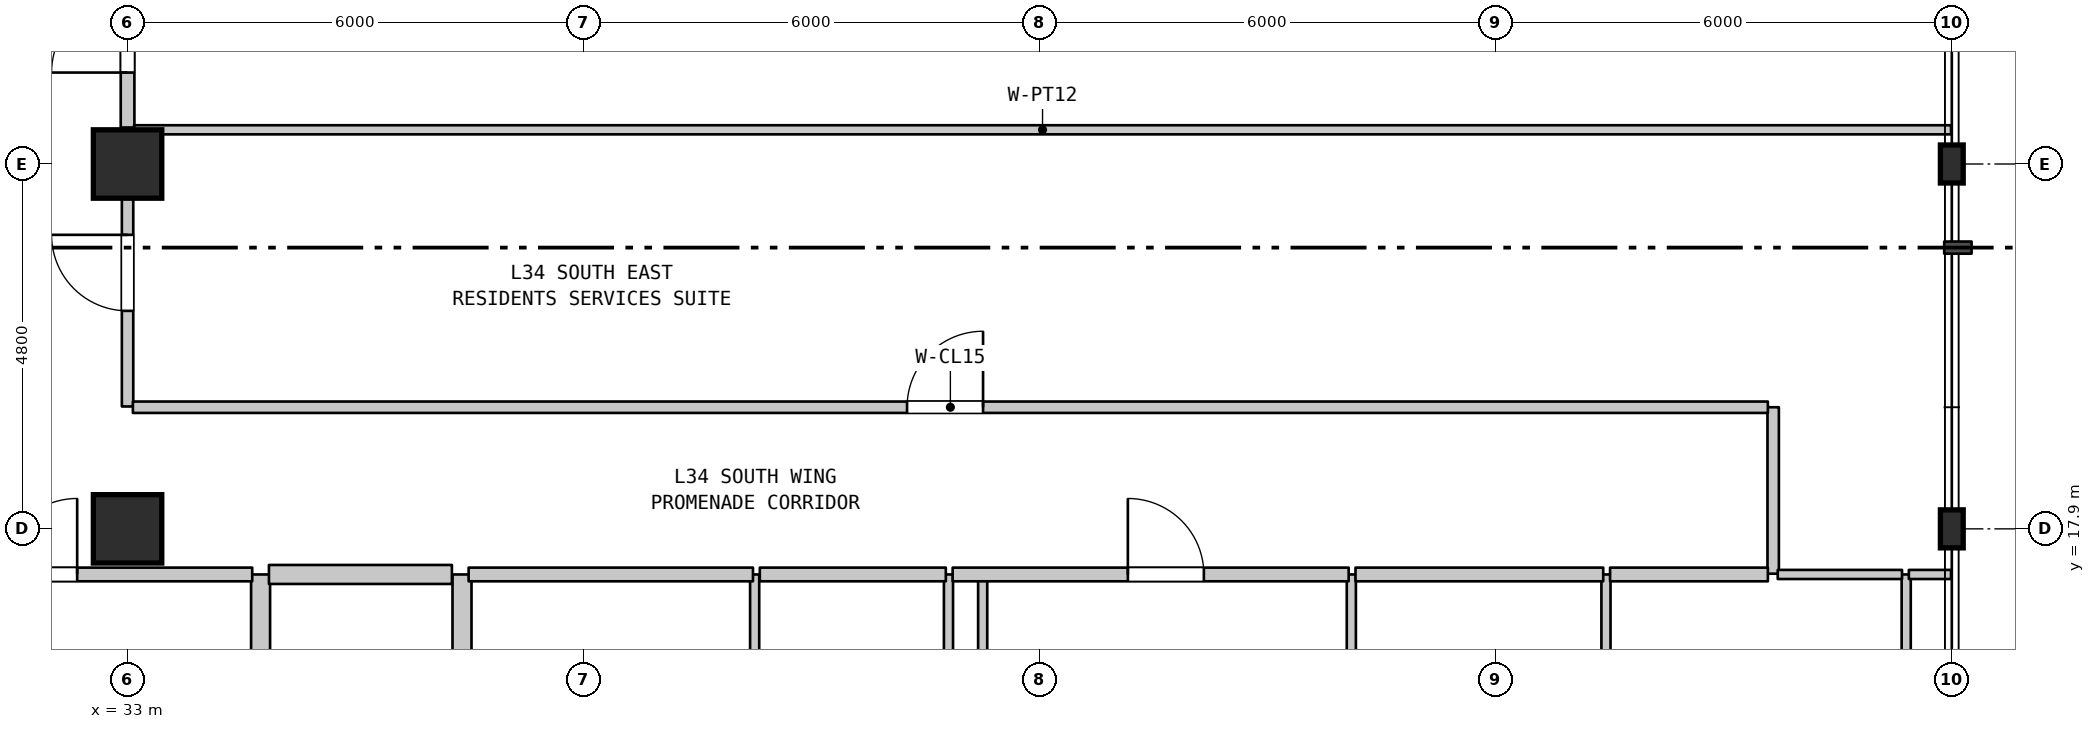
"""IFC4 building model, lengths in metres.
Left out: names, types, materials, properties, quantities, classifications, styles, units other than length and angle.
Written with IfcOpenShell. Run it as: python <this file> out.ifc"""

import sys

from ifc_helpers import new_model, si_unit, direction, frame, frame_2d, origin, origin_2d, place, context, subcontext, project, spatial, rectangle, i_section, extrude, element, fill, save


model = new_model("IFC4")
c1 = context("Model", 3, precision=1e-05, world=origin(), true_north=direction((0.0, 1.0)))
c2 = subcontext(c1, "Body", "Model", "MODEL_VIEW")
j1 = project(units=[si_unit("LENGTHUNIT", "METRE"), si_unit("PLANEANGLEUNIT", "RADIAN")], contexts=[c1])
p1 = place(None, origin())
s1 = spatial("IfcSite", under=j1, at=p1, CompositionType="ELEMENT")
p2 = place(p1, origin())
s2 = spatial("IfcBuilding", under=s1, at=p2, CompositionType="ELEMENT")
p3 = place(p2, frame((0.0, 0.0, 140.9)))
s3 = spatial("IfcBuildingStorey", under=s2, at=p3, CompositionType="ELEMENT", Elevation=140.9)
for number, where, z_axis, x_axis in (
    (1, (33.0, 17.9, 0.0), (0.0, 0.0, 1.0), (1.0, 0.0, 0.0)),
    (2, (33.0, 22.7, 0.0), (0.0, 0.0, 1.0), (1.0, 0.0, 0.0)),
):
    element("IfcColumn", number, at=place(p3, frame(where, z_axis=z_axis, x_axis=x_axis)), inside=s3, PredefinedType="COLUMN", context=c2, shape_type="SweptSolid", body=[
        extrude(rectangle(XDim=0.9, YDim=0.9, at=origin_2d()), origin(), (0.0, 0.0, 1.0), 3.7),
    ])
for number, where, z_axis, x_axis in (
    (3, (57.0, 17.9, 0.0), (0.0, 0.0, 1.0), (1.0, 0.0, 0.0)),
    (4, (57.0, 22.7, 0.0), (0.0, 0.0, 1.0), (1.0, 0.0, 0.0)),
):
    element("IfcColumn", number, at=place(p3, frame(where, z_axis=z_axis, x_axis=x_axis)), inside=s3, PredefinedType="COLUMN", context=c2, shape_type="SweptSolid", body=[
        extrude(i_section(OverallWidth=0.3, OverallDepth=0.5, WebThickness=0.014, FlangeThickness=0.028, FilletRadius=0.027, at=origin_2d()), origin(), (0.0, 0.0, 1.0), 3.7),
    ])
p4 = place(p3, frame((33.0, 19.51, 0.0), z_axis=(0.0, 0.0, 1.0), x_axis=(0.0, 1.0, 0.0)))
e5 = element("IfcWall", 5, at=p4, inside=s3, PredefinedType="STANDARD", context=c2, shape_type="SweptSolid", body=[
    extrude(rectangle(XDim=3.66, YDim=0.15, at=frame_2d((1.83, 0.0))), origin(), (0.0, 0.0, 1.0), 2.935),
])
p5 = place(p4, frame((1.258, 0.0, 0.0)))
e6 = element("IfcOpeningElement", 6, at=p5, cuts=e5, PredefinedType="OPENING", context=c2, shape_type="SweptSolid", body=[
    extrude(rectangle(XDim=1.0, YDim=2.15, at=frame_2d((0.5, 1.075))), frame((0.0, 0.085, 0.0), z_axis=(0.0, -1.0, 0.0), x_axis=(1.0, 0.0, 0.0)), (0.0, 0.0, 1.0), 0.17),
])
p6 = place(p3, frame((33.0, 23.18, 0.0), z_axis=(0.0, 0.0, 1.0), x_axis=(0.0, 1.0, 0.0)))
e7 = element("IfcWall", 7, at=p6, inside=s3, PredefinedType="STANDARD", context=c2, shape_type="SweptSolid", body=[
    extrude(rectangle(XDim=2.6, YDim=0.18, at=frame_2d((1.3, 0.0))), origin(), (0.0, 0.0, 1.0), 2.935),
])
p7 = place(p6, frame((0.723, 0.0, 0.0)))
e8 = element("IfcOpeningElement", 8, at=p7, cuts=e7, PredefinedType="OPENING", context=c2, shape_type="SweptSolid", body=[
    extrude(rectangle(XDim=1.0, YDim=2.15, at=frame_2d((0.5, 1.075))), frame((0.0, 0.1, 0.0), z_axis=(0.0, -1.0, 0.0), x_axis=(1.0, 0.0, 0.0)), (0.0, 0.0, 1.0), 0.2),
])
for number, where, z_axis, x_axis in (
    (9, (34.75, 11.15, 0.0), (0.0, 0.0, 1.0), (0.0, 1.0, 0.0)),
    (10, (37.4, 11.15, 0.0), (0.0, 0.0, 1.0), (0.0, 1.0, 0.0)),
):
    element("IfcWall", number, at=place(p3, frame(where, z_axis=z_axis, x_axis=x_axis)), inside=s3, PredefinedType="STANDARD", context=c2, shape_type="SweptSolid", body=[
        extrude(rectangle(XDim=6.15, YDim=0.25, at=frame_2d((3.075, 0.0))), origin(), (0.0, 0.0, 1.0), 3.385),
    ])
for number, where, z_axis, x_axis in (
    (11, (41.25, 11.15, 0.0), (0.0, 0.0, 1.0), (0.0, 1.0, 0.0)),
    (12, (43.8, 11.15, 0.0), (0.0, 0.0, 1.0), (0.0, 1.0, 0.0)),
):
    element("IfcWall", number, at=place(p3, frame(where, z_axis=z_axis, x_axis=x_axis)), inside=s3, PredefinedType="PARTITIONING", context=c2, shape_type="SweptSolid", body=[
        extrude(rectangle(XDim=6.15, YDim=0.12, at=frame_2d((3.075, 0.0))), origin(), (0.0, 0.0, 1.0), 3.385),
    ])
p8 = place(p3, frame((44.25, 14.85, 0.0), z_axis=(0.0, 0.0, 1.0), x_axis=(0.0, 1.0, 0.0)))
e13 = element("IfcWall", 13, at=p8, inside=s3, PredefinedType="PARTITIONING", context=c2, shape_type="SweptSolid", body=[
    extrude(rectangle(XDim=2.45, YDim=0.12, at=frame_2d((1.225, 0.0))), origin(), (0.0, 0.0, 1.0), 3.385),
])
for number, where, z_axis, x_axis in (
    (14, (49.1, 11.15, 0.0), (0.0, 0.0, 1.0), (0.0, 1.0, 0.0)),
    (15, (52.45, 11.15, 0.0), (0.0, 0.0, 1.0), (0.0, 1.0, 0.0)),
):
    element("IfcWall", number, at=place(p3, frame(where, z_axis=z_axis, x_axis=x_axis)), inside=s3, PredefinedType="PARTITIONING", context=c2, shape_type="SweptSolid", body=[
        extrude(rectangle(XDim=6.15, YDim=0.12, at=frame_2d((3.075, 0.0))), origin(), (0.0, 0.0, 1.0), 3.385),
    ])
p9 = place(p3, frame((54.65, 17.31, 0.0), z_axis=(0.0, 0.0, 1.0), x_axis=(0.0, 1.0, 0.0)))
e16 = element("IfcWall", 16, at=p9, inside=s3, PredefinedType="STANDARD", context=c2, shape_type="SweptSolid", body=[
    extrude(rectangle(XDim=2.19, YDim=0.15, at=frame_2d((1.095, 0.0))), origin(), (0.0, 0.0, 1.0), 3.385),
])
p10 = place(p3, frame((56.4, 11.15, 0.0), z_axis=(0.0, 0.0, 1.0), x_axis=(0.0, 1.0, 0.0)))
e17 = element("IfcWall", 17, at=p10, inside=s3, PredefinedType="PARTITIONING", context=c2, shape_type="SweptSolid", body=[
    extrude(rectangle(XDim=6.15, YDim=0.12, at=frame_2d((3.075, 0.0))), origin(), (0.0, 0.0, 1.0), 3.385),
])
p11 = place(p3, frame((29.545, 17.3, 0.0), z_axis=(0.0, 0.0, 1.0), x_axis=(1.0, 0.0, 0.0)))
e18 = element("IfcWall", 18, at=p11, inside=s3, PredefinedType="STANDARD", context=c2, shape_type="SweptSolid", body=[
    extrude(rectangle(XDim=5.095, YDim=0.18, at=frame_2d((2.547, 0.0))), origin(), (0.0, 0.0, 1.0), 3.385),
])
p12 = place(p11, frame((1.792, 0.0, 0.0)))
e19 = element("IfcOpeningElement", 19, at=p12, cuts=e18, PredefinedType="OPENING", context=c2, shape_type="SweptSolid", body=[
    extrude(rectangle(XDim=1.0, YDim=2.15, at=frame_2d((0.5, 1.075))), frame((0.0, 0.1, 0.0), z_axis=(0.0, -1.0, 0.0), x_axis=(1.0, 0.0, 0.0)), (0.0, 0.0, 1.0), 0.2),
])
p13 = place(p3, frame((34.86, 17.3, 0.0), z_axis=(0.0, 0.0, 1.0), x_axis=(1.0, 0.0, 0.0)))
e20 = element("IfcWall", 20, at=p13, inside=s3, PredefinedType="STANDARD", context=c2, shape_type="SweptSolid", body=[
    extrude(rectangle(XDim=2.407, YDim=0.25, at=frame_2d((1.204, 0.0))), origin(), (0.0, 0.0, 1.0), 3.385),
])
p14 = place(p3, frame((37.487, 17.3, 0.0), z_axis=(0.0, 0.0, 1.0), x_axis=(1.0, 0.0, 0.0)))
e21 = element("IfcWall", 21, at=p14, inside=s3, PredefinedType="STANDARD", context=c2, shape_type="SweptSolid", body=[
    extrude(rectangle(XDim=3.741, YDim=0.18, at=frame_2d((1.871, 0.0))), origin(), (0.0, 0.0, 1.0), 3.385),
])
p15 = place(p3, frame((41.318, 17.3, 0.0), z_axis=(0.0, 0.0, 1.0), x_axis=(1.0, 0.0, 0.0)))
e22 = element("IfcWall", 22, at=p15, inside=s3, PredefinedType="STANDARD", context=c2, shape_type="SweptSolid", body=[
    extrude(rectangle(XDim=2.447, YDim=0.18, at=frame_2d((1.223, 0.0))), origin(), (0.0, 0.0, 1.0), 3.385),
])
p16 = place(p3, frame((43.855, 17.3, 0.0), z_axis=(0.0, 0.0, 1.0), x_axis=(1.0, 0.0, 0.0)))
e23 = element("IfcWall", 23, at=p16, inside=s3, PredefinedType="STANDARD", context=c2, shape_type="SweptSolid", body=[
    extrude(rectangle(XDim=5.21, YDim=0.18, at=frame_2d((2.605, 0.0))), origin(), (0.0, 0.0, 1.0), 3.385),
])
p17 = place(p16, frame((2.305, 0.0, 0.0)))
e24 = element("IfcOpeningElement", 24, at=p17, cuts=e23, PredefinedType="OPENING", context=c2, shape_type="SweptSolid", body=[
    extrude(rectangle(XDim=1.0, YDim=2.15, at=frame_2d((0.5, 1.075))), frame((0.0, 0.1, 0.0), z_axis=(0.0, -1.0, 0.0), x_axis=(1.0, 0.0, 0.0)), (0.0, 0.0, 1.0), 0.2),
])
p18 = place(p3, frame((49.155, 17.3, 0.0), z_axis=(0.0, 0.0, 1.0), x_axis=(1.0, 0.0, 0.0)))
e25 = element("IfcWall", 25, at=p18, inside=s3, PredefinedType="STANDARD", context=c2, shape_type="SweptSolid", body=[
    extrude(rectangle(XDim=3.259, YDim=0.18, at=frame_2d((1.629, 0.0))), origin(), (0.0, 0.0, 1.0), 3.385),
])
p19 = place(p3, frame((52.504, 17.3, 0.0), z_axis=(0.0, 0.0, 1.0), x_axis=(1.0, 0.0, 0.0)))
e26 = element("IfcWall", 26, at=p19, inside=s3, PredefinedType="STANDARD", context=c2, shape_type="SweptSolid", body=[
    extrude(rectangle(XDim=2.076, YDim=0.18, at=frame_2d((1.038, 0.0))), origin(), (0.0, 0.0, 1.0), 3.385),
])
p20 = place(p3, frame((54.71, 17.3, 0.0), z_axis=(0.0, 0.0, 1.0), x_axis=(1.0, 0.0, 0.0)))
e27 = element("IfcWall", 27, at=p20, inside=s3, PredefinedType="PARTITIONING", context=c2, shape_type="SweptSolid", body=[
    extrude(rectangle(XDim=1.635, YDim=0.12, at=frame_2d((0.817, 0.0))), origin(), (0.0, 0.0, 1.0), 3.385),
])
p21 = place(p3, frame((56.435, 17.3, 0.0), z_axis=(0.0, 0.0, 1.0), x_axis=(1.0, 0.0, 0.0)))
e28 = element("IfcWall", 28, at=p21, inside=s3, PredefinedType="PARTITIONING", context=c2, shape_type="SweptSolid", body=[
    extrude(rectangle(XDim=0.555, YDim=0.12, at=frame_2d((0.277, 0.0))), origin(), (0.0, 0.0, 1.0), 3.385),
])
p22 = place(p3, frame((33.07, 19.5, 0.0), z_axis=(0.0, 0.0, 1.0), x_axis=(1.0, 0.0, 0.0)))
e29 = element("IfcWall", 29, at=p22, inside=s3, PredefinedType="STANDARD", context=c2, shape_type="SweptSolid", body=[
    extrude(rectangle(XDim=21.51, YDim=0.15, at=frame_2d((10.755, 0.0))), origin(), (0.0, 0.0, 1.0), 3.385),
])
p23 = place(p22, frame((10.185, 0.0, 0.0)))
e30 = element("IfcOpeningElement", 30, at=p23, cuts=e29, PredefinedType="OPENING", context=c2, shape_type="SweptSolid", body=[
    extrude(rectangle(XDim=1.0, YDim=2.15, at=frame_2d((0.5, 1.075))), frame((0.0, 0.085, 0.0), z_axis=(0.0, -1.0, 0.0), x_axis=(1.0, 0.0, 0.0)), (0.0, 0.0, 1.0), 0.17),
])
p24 = place(p3, frame((33.085, 23.15, 0.0), z_axis=(0.0, 0.0, 1.0), x_axis=(1.0, 0.0, 0.0)))
e31 = element("IfcWall", 31, at=p24, inside=s3, PredefinedType="PARTITIONING", context=c2, shape_type="SweptSolid", body=[
    extrude(rectangle(XDim=23.905, YDim=0.12, at=frame_2d((11.953, 0.0))), origin(), (0.0, 0.0, 1.0), 3.385),
])
p25 = place(p5, origin())
e32 = element("IfcDoor", 32, at=p25, inside=s3, OperationType="SINGLE_SWING_RIGHT", PredefinedType="DOOR", context=c2, shape_type="SweptSolid", body=[
    extrude(rectangle(XDim=1.0, YDim=2.15, at=frame_2d((0.5, 1.075))), frame((0.0, 0.025, 0.0), z_axis=(0.0, -1.0, 0.0), x_axis=(1.0, 0.0, 0.0)), (0.0, 0.0, 1.0), 0.05),
])
fill(e6, e32)
p26 = place(p7, origin())
e33 = element("IfcDoor", 33, at=p26, inside=s3, OperationType="SINGLE_SWING_LEFT", PredefinedType="DOOR", context=c2, shape_type="SweptSolid", body=[
    extrude(rectangle(XDim=1.0, YDim=2.15, at=frame_2d((0.5, 1.075))), frame((0.0, 0.025, 0.0), z_axis=(0.0, -1.0, 0.0), x_axis=(1.0, 0.0, 0.0)), (0.0, 0.0, 1.0), 0.05),
])
fill(e8, e33)
p27 = place(p12, origin())
e34 = element("IfcDoor", 34, at=p27, inside=s3, OperationType="SINGLE_SWING_RIGHT", PredefinedType="DOOR", context=c2, shape_type="SweptSolid", body=[
    extrude(rectangle(XDim=1.0, YDim=2.15, at=frame_2d((0.5, 1.075))), frame((0.0, 0.025, 0.0), z_axis=(0.0, -1.0, 0.0), x_axis=(1.0, 0.0, 0.0)), (0.0, 0.0, 1.0), 0.05),
])
fill(e19, e34)
p28 = place(p17, origin())
e35 = element("IfcDoor", 35, at=p28, inside=s3, OperationType="SINGLE_SWING_LEFT", PredefinedType="DOOR", context=c2, shape_type="SweptSolid", body=[
    extrude(rectangle(XDim=1.0, YDim=2.15, at=frame_2d((0.5, 1.075))), frame((0.0, 0.025, 0.0), z_axis=(0.0, -1.0, 0.0), x_axis=(1.0, 0.0, 0.0)), (0.0, 0.0, 1.0), 0.05),
])
fill(e24, e35)
p29 = place(p23, origin())
e36 = element("IfcDoor", 36, at=p29, inside=s3, OperationType="SINGLE_SWING_RIGHT", PredefinedType="DOOR", context=c2, shape_type="SweptSolid", body=[
    extrude(rectangle(XDim=1.0, YDim=2.15, at=frame_2d((0.5, 1.075))), frame((0.0, 0.025, 0.0), z_axis=(0.0, -1.0, 0.0), x_axis=(1.0, 0.0, 0.0)), (0.0, 0.0, 1.0), 0.05),
])
fill(e30, e36)
save(model, sys.argv[1])
